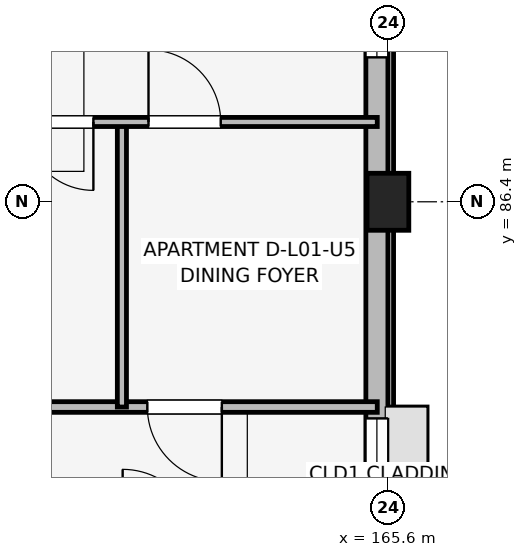
"""IFC4 building model, lengths in metres.
Left out: names, types, materials, properties, quantities, classifications, styles, units other than length and angle.
Written with IfcOpenShell. Run it as: python <this file> out.ifc"""

import sys

from ifc_helpers import new_model, si_unit, direction, frame, frame_2d, origin, origin_2d, place, context, subcontext, project, spatial, rectangle, extrude, element, fill, save


model = new_model("IFC4")
c1 = context("Model", 3, precision=1e-05, world=origin(), true_north=direction((0.0, 1.0)))
c2 = subcontext(c1, "Body", "Model", "MODEL_VIEW")
j1 = project(units=[si_unit("LENGTHUNIT", "METRE"), si_unit("PLANEANGLEUNIT", "RADIAN")], contexts=[c1])
p1 = place(None, origin())
s1 = spatial("IfcSite", under=j1, at=p1, CompositionType="ELEMENT")
p2 = place(p1, origin())
s2 = spatial("IfcBuilding", under=s1, at=p2, CompositionType="ELEMENT")
p3 = place(p2, frame((0.0, 0.0, 4.5)))
s3 = spatial("IfcBuildingStorey", under=s2, at=p3, CompositionType="ELEMENT", Elevation=4.5)
p4 = place(p3, frame((165.6, 86.4, 0.0), z_axis=(0.0, 0.0, 1.0), x_axis=(1.0, 0.0, 0.0)))
e1 = element("IfcColumn", 1, at=p4, inside=s3, PredefinedType="COLUMN", context=c2, shape_type="SweptSolid", body=[
    extrude(rectangle(XDim=0.55, YDim=0.75, at=origin_2d()), origin(), (0.0, 0.0, 1.0), 4.2),
])
p5 = place(p3, frame((165.455, 74.8, 0.0), z_axis=(0.0, 0.0, 1.0), x_axis=(0.0, 1.0, 0.0)))
e2 = element("IfcWall", 2, at=p5, inside=s3, PredefinedType="SOLIDWALL", context=c2, shape_type="SweptSolid", body=[
    extrude(rectangle(XDim=16.0, YDim=0.29, at=frame_2d((8.0, 0.0))), origin(), (0.0, 0.0, 1.0), 3.43),
])
p6 = place(p5, frame((7.25, 0.0, 1.05)))
e3 = element("IfcOpeningElement", 3, at=p6, cuts=e2, PredefinedType="OPENING", context=c2, shape_type="SweptSolid", body=[
    extrude(rectangle(XDim=1.5, YDim=1.15, at=frame_2d((0.75, 0.575))), frame((0.0, 0.155, 0.0), z_axis=(0.0, -1.0, 0.0), x_axis=(1.0, 0.0, 0.0)), (0.0, 0.0, 1.0), 0.31),
])
p7 = place(p5, frame((13.5, 0.0, 0.75)))
e4 = element("IfcOpeningElement", 4, at=p7, cuts=e2, PredefinedType="OPENING", context=c2, shape_type="SweptSolid", body=[
    extrude(rectangle(XDim=1.42, YDim=1.6, at=frame_2d((0.71, 0.8))), frame((0.0, 0.155, 0.0), z_axis=(0.0, -1.0, 0.0), x_axis=(1.0, 0.0, 0.0)), (0.0, 0.0, 1.0), 0.31),
])
p8 = place(p3, frame((158.54, 83.7, 0.0), z_axis=(0.0, 0.0, 1.0), x_axis=(1.0, 0.0, 0.0)))
e5 = element("IfcWall", 5, at=p8, inside=s3, PredefinedType="PARTITIONING", context=c2, shape_type="SweptSolid", body=[
    extrude(rectangle(XDim=6.92, YDim=0.14, at=frame_2d((3.46, 0.0))), origin(), (0.0, 0.0, 1.0), 3.25),
])
p9 = place(p8, frame((4.875, 0.0, 0.0), z_axis=(0.0, 0.0, 1.0), x_axis=(-1.0, 0.0, 0.0)))
e6 = element("IfcOpeningElement", 6, at=p9, cuts=e5, PredefinedType="OPENING", context=c2, shape_type="SweptSolid", body=[
    extrude(rectangle(XDim=0.98, YDim=2.1, at=frame_2d((0.49, 1.05))), frame((0.0, 0.08, 0.0), z_axis=(0.0, -1.0, 0.0), x_axis=(1.0, 0.0, 0.0)), (0.0, 0.0, 1.0), 0.16),
])
p10 = place(p3, frame((162.1, 83.7, 0.0), z_axis=(0.0, 0.0, 1.0), x_axis=(0.0, 1.0, 0.0)))
e7 = element("IfcWall", 7, at=p10, inside=s3, PredefinedType="PARTITIONING", context=c2, shape_type="SweptSolid", body=[
    extrude(rectangle(XDim=3.75, YDim=0.12, at=frame_2d((1.875, 0.0))), origin(), (0.0, 0.0, 1.0), 3.25),
])
p11 = place(p3, frame((158.54, 87.45, 0.0), z_axis=(0.0, 0.0, 1.0), x_axis=(1.0, 0.0, 0.0)))
e8 = element("IfcWall", 8, at=p11, inside=s3, PredefinedType="PARTITIONING", context=c2, shape_type="SweptSolid", body=[
    extrude(rectangle(XDim=6.92, YDim=0.12, at=frame_2d((3.46, 0.0))), origin(), (0.0, 0.0, 1.0), 3.25),
])
p12 = place(p11, frame((0.53, 0.0, 0.0)))
e9 = element("IfcOpeningElement", 9, at=p12, cuts=e8, PredefinedType="OPENING", context=c2, shape_type="SweptSolid", body=[
    extrude(rectangle(XDim=0.85, YDim=2.08, at=frame_2d((0.425, 1.04))), frame((0.0, 0.07, 0.0), z_axis=(0.0, -1.0, 0.0), x_axis=(1.0, 0.0, 0.0)), (0.0, 0.0, 1.0), 0.14),
])
p13 = place(p11, frame((3.185, 0.0, 0.0), z_axis=(0.0, 0.0, 1.0), x_axis=(-1.0, 0.0, 0.0)))
e10 = element("IfcOpeningElement", 10, at=p13, cuts=e8, PredefinedType="OPENING", context=c2, shape_type="SweptSolid", body=[
    extrude(rectangle(XDim=0.9, YDim=2.08, at=frame_2d((0.45, 1.04))), frame((0.0, 0.07, 0.0), z_axis=(0.0, -1.0, 0.0), x_axis=(1.0, 0.0, 0.0)), (0.0, 0.0, 1.0), 0.14),
])
p14 = place(p11, frame((3.91, 0.0, 0.0)))
e11 = element("IfcOpeningElement", 11, at=p14, cuts=e8, PredefinedType="OPENING", context=c2, shape_type="SweptSolid", body=[
    extrude(rectangle(XDim=0.95, YDim=2.08, at=frame_2d((0.475, 1.04))), frame((0.0, 0.07, 0.0), z_axis=(0.0, -1.0, 0.0), x_axis=(1.0, 0.0, 0.0)), (0.0, 0.0, 1.0), 0.14),
])
p15 = place(p6, origin())
e12 = element("IfcWindow", 12, at=p15, inside=s3, PartitioningType="SINGLE_PANEL", PredefinedType="WINDOW", context=c2, shape_type="SweptSolid", body=[
    extrude(rectangle(XDim=1.5, YDim=1.15, at=frame_2d((0.75, 0.575))), frame((0.0, 0.03, 0.0), z_axis=(0.0, -1.0, 0.0), x_axis=(1.0, 0.0, 0.0)), (0.0, 0.0, 1.0), 0.06),
])
fill(e3, e12)
p16 = place(p7, origin())
e13 = element("IfcWindow", 13, at=p16, inside=s3, PartitioningType="SINGLE_PANEL", PredefinedType="WINDOW", context=c2, shape_type="SweptSolid", body=[
    extrude(rectangle(XDim=1.42, YDim=1.6, at=frame_2d((0.71, 0.8))), frame((0.0, 0.03, 0.0), z_axis=(0.0, -1.0, 0.0), x_axis=(1.0, 0.0, 0.0)), (0.0, 0.0, 1.0), 0.06),
])
fill(e4, e13)
p17 = place(p9, origin())
e14 = element("IfcDoor", 14, at=p17, inside=s3, OperationType="SINGLE_SWING_RIGHT", PredefinedType="DOOR", context=c2, shape_type="SweptSolid", body=[
    extrude(rectangle(XDim=0.98, YDim=2.1, at=frame_2d((0.49, 1.05))), frame((0.0, 0.025, 0.0), z_axis=(0.0, -1.0, 0.0), x_axis=(1.0, 0.0, 0.0)), (0.0, 0.0, 1.0), 0.05),
])
fill(e6, e14)
p18 = place(p13, origin())
e15 = element("IfcDoor", 15, at=p18, inside=s3, OperationType="SINGLE_SWING_RIGHT", PredefinedType="DOOR", context=c2, shape_type="SweptSolid", body=[
    extrude(rectangle(XDim=0.9, YDim=2.08, at=frame_2d((0.45, 1.04))), frame((0.0, 0.025, 0.0), z_axis=(0.0, -1.0, 0.0), x_axis=(1.0, 0.0, 0.0)), (0.0, 0.0, 1.0), 0.05),
])
fill(e10, e15)
p19 = place(p14, origin())
e16 = element("IfcDoor", 16, at=p19, inside=s3, OperationType="SINGLE_SWING_LEFT", PredefinedType="DOOR", context=c2, shape_type="SweptSolid", body=[
    extrude(rectangle(XDim=0.95, YDim=2.08, at=frame_2d((0.475, 1.04))), frame((0.0, 0.025, 0.0), z_axis=(0.0, -1.0, 0.0), x_axis=(1.0, 0.0, 0.0)), (0.0, 0.0, 1.0), 0.05),
])
fill(e11, e16)
save(model, sys.argv[1])
